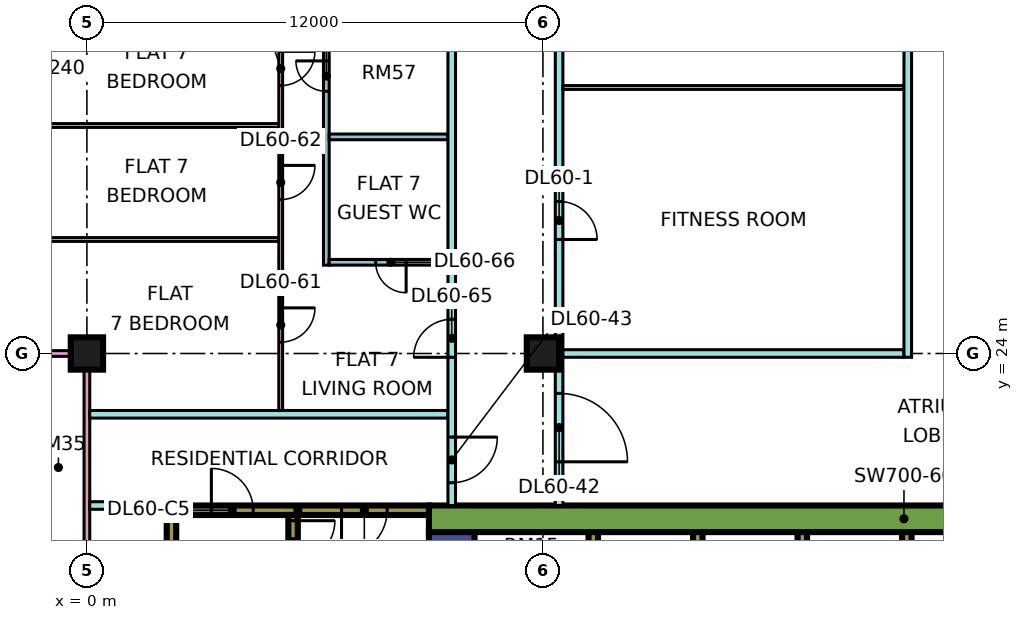
"""IFC4 building model, lengths in metres.
Left out: names, types, materials, properties, quantities, classifications, styles, units other than length and angle.
Written with IfcOpenShell. Run it as: python <this file> out.ifc"""

import sys

from ifc_helpers import new_model, si_unit, direction, frame, frame_2d, origin, origin_2d, place, context, subcontext, project, spatial, rectangle, extrude, element, fill, save


model = new_model("IFC4")
c1 = context("Model", 3, precision=1e-05, world=origin(), true_north=direction((0.0, 1.0)))
c2 = subcontext(c1, "Body", "Model", "MODEL_VIEW")
j1 = project(units=[si_unit("LENGTHUNIT", "METRE"), si_unit("PLANEANGLEUNIT", "RADIAN")], contexts=[c1])
p1 = place(None, origin())
s1 = spatial("IfcSite", under=j1, at=p1, CompositionType="ELEMENT")
p2 = place(p1, origin())
s2 = spatial("IfcBuilding", under=s1, at=p2, CompositionType="ELEMENT")
p3 = place(p2, frame((0.0, 0.0, 252.9)))
s3 = spatial("IfcBuildingStorey", under=s2, at=p3, CompositionType="ELEMENT", Elevation=252.9)
for number, where, z_axis, x_axis in (
    (1, (0.0, 24.0, 0.0), (0.0, 0.0, 1.0), (1.0, 0.0, 0.0)),
    (2, (12.0, 24.0, 0.0), (0.0, 0.0, 1.0), (1.0, 0.0, 0.0)),
):
    element("IfcColumn", number, at=place(p3, frame(where, z_axis=z_axis, x_axis=x_axis)), inside=s3, PredefinedType="COLUMN", context=c2, shape_type="SweptSolid", body=[
        extrude(rectangle(XDim=0.85, YDim=0.85, at=origin_2d()), origin(), (0.0, 0.0, 1.0), 3.75),
    ])
p4 = place(p3, frame((9.0, 19.65, 0.0), z_axis=(0.0, 0.0, 1.0), x_axis=(1.0, 0.0, 0.0)))
e3 = element("IfcWall", 3, at=p4, inside=s3, PredefinedType="SHEAR", context=c2, shape_type="SweptSolid", body=[
    extrude(rectangle(XDim=25.0, YDim=0.7, at=frame_2d((12.5, 0.0))), origin(), (0.0, 0.0, 1.0), 3.75),
])
p5 = place(p4, frame((19.1, 0.0, 0.0)))
e4 = element("IfcOpeningElement", 4, at=p5, cuts=e3, PredefinedType="OPENING", context=c2, shape_type="SweptSolid", body=[
    extrude(rectangle(XDim=1.8, YDim=2.4, at=frame_2d((0.9, 1.2))), frame((0.0, 0.36, 0.0), z_axis=(0.0, -1.0, 0.0), x_axis=(1.0, 0.0, 0.0)), (0.0, 0.0, 1.0), 0.72),
])
p6 = place(p3, frame((9.6, 7.7, 0.0), z_axis=(0.0, 0.0, 1.0), x_axis=(0.0, 1.0, 0.0)))
e5 = element("IfcWall", 5, at=p6, inside=s3, PredefinedType="SHEAR", context=c2, shape_type="SweptSolid", body=[
    extrude(rectangle(XDim=11.6, YDim=1.2, at=frame_2d((5.8, 0.0))), origin(), (0.0, 0.0, 1.0), 3.75),
])
p7 = place(p6, frame((4.175, 0.0, 0.0)))
e6 = element("IfcOpeningElement", 6, at=p7, cuts=e5, PredefinedType="OPENING", context=c2, shape_type="SweptSolid", body=[
    extrude(rectangle(XDim=1.1, YDim=2.2, at=frame_2d((0.55, 1.1))), frame((0.0, 0.61, 0.0), z_axis=(0.0, -1.0, 0.0), x_axis=(1.0, 0.0, 0.0)), (0.0, 0.0, 1.0), 1.22),
])
p8 = place(p6, frame((6.675, 0.0, 0.0)))
e7 = element("IfcOpeningElement", 7, at=p8, cuts=e5, PredefinedType="OPENING", context=c2, shape_type="SweptSolid", body=[
    extrude(rectangle(XDim=1.1, YDim=2.2, at=frame_2d((0.55, 1.1))), frame((0.0, 0.61, 0.0), z_axis=(0.0, -1.0, 0.0), x_axis=(1.0, 0.0, 0.0)), (0.0, 0.0, 1.0), 1.22),
])
p9 = place(p6, frame((9.55, 0.0, 0.0)))
e8 = element("IfcOpeningElement", 8, at=p9, cuts=e5, PredefinedType="OPENING", context=c2, shape_type="SweptSolid", body=[
    extrude(rectangle(XDim=1.1, YDim=2.2, at=frame_2d((0.55, 1.1))), frame((0.0, 0.61, 0.0), z_axis=(0.0, -1.0, 0.0), x_axis=(1.0, 0.0, 0.0)), (0.0, 0.0, 1.0), 1.22),
])
p10 = place(p6, frame((1.85, 0.0, 0.0)))
e9 = element("IfcOpeningElement", 9, at=p10, cuts=e5, PredefinedType="OPENING", context=c2, shape_type="SweptSolid", body=[
    extrude(rectangle(XDim=0.9, YDim=2.1, at=frame_2d((0.45, 1.05))), frame((0.0, 0.61, 0.0), z_axis=(0.0, -1.0, 0.0), x_axis=(1.0, 0.0, 0.0)), (0.0, 0.0, 1.0), 1.22),
])
p11 = place(p3, frame((13.325, 7.7, 0.0), z_axis=(0.0, 0.0, 1.0), x_axis=(0.0, 1.0, 0.0)))
e10 = element("IfcWall", 10, at=p11, inside=s3, PredefinedType="SHEAR", context=c2, shape_type="SweptSolid", body=[
    extrude(rectangle(XDim=11.6, YDim=0.25, at=frame_2d((5.8, 0.0))), origin(), (0.0, 0.0, 1.0), 3.75),
])
for number, where, z_axis, x_axis in (
    (11, (16.075, 15.8, 0.0), (0.0, 0.0, 1.0), (0.0, 1.0, 0.0)),
    (12, (18.825, 15.8, 0.0), (0.0, 0.0, 1.0), (0.0, 1.0, 0.0)),
    (13, (21.575, 15.8, 0.0), (0.0, 0.0, 1.0), (0.0, 1.0, 0.0)),
):
    element("IfcWall", number, at=place(p3, frame(where, z_axis=z_axis, x_axis=x_axis)), inside=s3, PredefinedType="SHEAR", context=c2, shape_type="SweptSolid", body=[
        extrude(rectangle(XDim=3.5, YDim=0.25, at=frame_2d((1.75, 0.0))), origin(), (0.0, 0.0, 1.0), 3.75),
    ])
p12 = place(p3, frame((2.1, 19.875, 0.0), z_axis=(0.0, 0.0, 1.0), x_axis=(1.0, 0.0, 0.0)))
e14 = element("IfcWall", 14, at=p12, inside=s3, PredefinedType="SHEAR", context=c2, shape_type="SweptSolid", body=[
    extrude(rectangle(XDim=6.9, YDim=0.25, at=frame_2d((3.45, 0.0))), origin(), (0.0, 0.0, 1.0), 3.75),
])
p13 = place(p12, frame((1.175, 0.0, 0.0)))
e15 = element("IfcOpeningElement", 15, at=p13, cuts=e14, PredefinedType="OPENING", context=c2, shape_type="SweptSolid", body=[
    extrude(rectangle(XDim=1.1, YDim=2.2, at=frame_2d((0.55, 1.1))), frame((0.0, 0.135, 0.0), z_axis=(0.0, -1.0, 0.0), x_axis=(1.0, 0.0, 0.0)), (0.0, 0.0, 1.0), 0.27),
])
p14 = place(p12, frame((4.6, 0.0, 0.0)))
e16 = element("IfcOpeningElement", 16, at=p14, cuts=e14, PredefinedType="OPENING", context=c2, shape_type="SweptSolid", body=[
    extrude(rectangle(XDim=1.2, YDim=2.2, at=frame_2d((0.6, 1.1))), frame((0.0, 0.135, 0.0), z_axis=(0.0, -1.0, 0.0), x_axis=(1.0, 0.0, 0.0)), (0.0, 0.0, 1.0), 0.27),
])
p15 = place(p3, frame((2.225, 13.25, 0.0), z_axis=(0.0, 0.0, 1.0), x_axis=(0.0, 1.0, 0.0)))
e17 = element("IfcWall", 17, at=p15, inside=s3, PredefinedType="SHEAR", context=c2, shape_type="SweptSolid", body=[
    extrude(rectangle(XDim=6.5, YDim=0.25, at=frame_2d((3.25, 0.0))), origin(), (0.0, 0.0, 1.0), 3.75),
])
p16 = place(p3, frame((5.425, 13.25, 0.0), z_axis=(0.0, 0.0, 1.0), x_axis=(0.0, 1.0, 0.0)))
e18 = element("IfcWall", 18, at=p16, inside=s3, PredefinedType="SHEAR", context=c2, shape_type="SweptSolid", body=[
    extrude(rectangle(XDim=6.5, YDim=0.25, at=frame_2d((3.25, 0.0))), origin(), (0.0, 0.0, 1.0), 3.75),
])
p17 = place(p16, frame((5.25, 0.0, 0.0)))
e19 = element("IfcOpeningElement", 19, at=p17, cuts=e18, PredefinedType="OPENING", context=c2, shape_type="SweptSolid", body=[
    extrude(rectangle(XDim=1.1, YDim=2.2, at=frame_2d((0.55, 1.1))), frame((0.0, 0.135, 0.0), z_axis=(0.0, -1.0, 0.0), x_axis=(1.0, 0.0, 0.0)), (0.0, 0.0, 1.0), 0.27),
])
p18 = place(p3, frame((0.0, 23.925, 0.0), z_axis=(0.0, 0.0, 1.0), x_axis=(0.0, -1.0, 0.0)))
e20 = element("IfcWall", 20, at=p18, inside=s3, PredefinedType="SOLIDWALL", context=c2, shape_type="SweptSolid", body=[
    extrude(rectangle(XDim=11.35, YDim=0.15, at=frame_2d((5.675, 0.0))), origin(), (0.0, 0.0, 1.0), 3.3),
])
p19 = place(p18, frame((6.738, 0.0, 0.0)))
e21 = element("IfcOpeningElement", 21, at=p19, cuts=e20, PredefinedType="OPENING", context=c2, shape_type="SweptSolid", body=[
    extrude(rectangle(XDim=1.8, YDim=2.4, at=frame_2d((0.9, 1.2))), frame((0.0, 0.085, 0.0), z_axis=(0.0, -1.0, 0.0), x_axis=(1.0, 0.0, 0.0)), (0.0, 0.0, 1.0), 0.17),
])
p20 = place(p3, frame((-1.5, 24.0, 0.0), z_axis=(0.0, 0.0, 1.0), x_axis=(1.0, 0.0, 0.0)))
e22 = element("IfcWall", 22, at=p20, inside=s3, PredefinedType="SOLIDWALL", context=c2, shape_type="SweptSolid", body=[
    extrude(rectangle(XDim=1.5, YDim=0.15, at=frame_2d((0.75, 0.0))), origin(), (0.0, 0.0, 1.0), 3.3),
])
for number, where, z_axis, x_axis in (
    (23, (-1.351, 27.0, 0.0), (0.0, 0.0, 1.0), (1.0, 0.0, 0.0)),
    (24, (-1.351, 30.0, 0.0), (0.0, 0.0, 1.0), (1.0, 0.0, 0.0)),
):
    element("IfcWall", number, at=place(p3, frame(where, z_axis=z_axis, x_axis=x_axis)), inside=s3, PredefinedType="PARTITIONING", context=c2, shape_type="SweptSolid", body=[
        extrude(rectangle(XDim=6.401, YDim=0.1, at=frame_2d((3.201, 0.0))), origin(), (0.0, 0.0, 1.0), 3.3),
    ])
p21 = place(p3, frame((0.074, 20.0, 0.0), z_axis=(0.0, 0.0, 1.0), x_axis=(1.0, 0.0, 0.0)))
e25 = element("IfcWall", 25, at=p21, inside=s3, PredefinedType="PARTITIONING", context=c2, shape_type="SweptSolid", body=[
    extrude(rectangle(XDim=2.026, YDim=0.2, at=frame_2d((1.013, 0.0))), origin(), (0.0, 0.0, 1.0), 3.3),
])
p22 = place(p3, frame((0.074, 22.4, 0.0), z_axis=(0.0, 0.0, 1.0), x_axis=(1.0, 0.0, 0.0)))
e26 = element("IfcWall", 26, at=p22, inside=s3, PredefinedType="PARTITIONING", context=c2, shape_type="SweptSolid", body=[
    extrude(rectangle(XDim=9.426, YDim=0.2, at=frame_2d((4.713, 0.0))), origin(), (0.0, 0.0, 1.0), 3.3),
])
p23 = place(p3, frame((5.1, 22.5, 0.0), z_axis=(0.0, 0.0, 1.0), x_axis=(0.0, 1.0, 0.0)))
e27 = element("IfcWall", 27, at=p23, inside=s3, PredefinedType="PARTITIONING", context=c2, shape_type="SweptSolid", body=[
    extrude(rectangle(XDim=10.55, YDim=0.1, at=frame_2d((5.275, 0.0))), origin(), (0.0, 0.0, 1.0), 3.3),
])
p24 = place(p23, frame((1.8, 0.0, 0.0)))
e28 = element("IfcOpeningElement", 28, at=p24, cuts=e27, PredefinedType="OPENING", context=c2, shape_type="SweptSolid", body=[
    extrude(rectangle(XDim=0.9, YDim=2.1, at=frame_2d((0.45, 1.05))), frame((0.0, 0.06, 0.0), z_axis=(0.0, -1.0, 0.0), x_axis=(1.0, 0.0, 0.0)), (0.0, 0.0, 1.0), 0.12),
])
p25 = place(p23, frame((5.55, 0.0, 0.0)))
e29 = element("IfcOpeningElement", 29, at=p25, cuts=e27, PredefinedType="OPENING", context=c2, shape_type="SweptSolid", body=[
    extrude(rectangle(XDim=0.9, YDim=2.1, at=frame_2d((0.45, 1.05))), frame((0.0, 0.06, 0.0), z_axis=(0.0, -1.0, 0.0), x_axis=(1.0, 0.0, 0.0)), (0.0, 0.0, 1.0), 0.12),
])
p26 = place(p23, frame((8.55, 0.0, 0.0)))
e30 = element("IfcOpeningElement", 30, at=p26, cuts=e27, PredefinedType="OPENING", context=c2, shape_type="SweptSolid", body=[
    extrude(rectangle(XDim=0.9, YDim=2.1, at=frame_2d((0.45, 1.05))), frame((0.0, 0.06, 0.0), z_axis=(0.0, -1.0, 0.0), x_axis=(1.0, 0.0, 0.0)), (0.0, 0.0, 1.0), 0.12),
])
p27 = place(p3, frame((6.3, 26.325, 0.0), z_axis=(0.0, 0.0, 1.0), x_axis=(0.0, 1.0, 0.0)))
e31 = element("IfcWall", 31, at=p27, inside=s3, PredefinedType="PARTITIONING", context=c2, shape_type="SweptSolid", body=[
    extrude(rectangle(XDim=9.575, YDim=0.15, at=frame_2d((4.788, 0.0))), origin(), (0.0, 0.0, 1.0), 3.3),
])
p28 = place(p27, frame((4.575, 0.0, 0.0)))
e32 = element("IfcOpeningElement", 32, at=p28, cuts=e31, PredefinedType="OPENING", context=c2, shape_type="SweptSolid", body=[
    extrude(rectangle(XDim=0.8, YDim=2.1, at=frame_2d((0.4, 1.05))), frame((0.0, 0.085, 0.0), z_axis=(0.0, -1.0, 0.0), x_axis=(1.0, 0.0, 0.0)), (0.0, 0.0, 1.0), 0.17),
])
p29 = place(p27, frame((7.725, 0.0, 0.0)))
e33 = element("IfcOpeningElement", 33, at=p29, cuts=e31, PredefinedType="OPENING", context=c2, shape_type="SweptSolid", body=[
    extrude(rectangle(XDim=0.9, YDim=2.1, at=frame_2d((0.45, 1.05))), frame((0.0, 0.085, 0.0), z_axis=(0.0, -1.0, 0.0), x_axis=(1.0, 0.0, 0.0)), (0.0, 0.0, 1.0), 0.17),
])
p30 = place(p3, frame((6.375, 26.4, 0.0), z_axis=(0.0, 0.0, 1.0), x_axis=(1.0, 0.0, 0.0)))
e34 = element("IfcWall", 34, at=p30, inside=s3, PredefinedType="PARTITIONING", context=c2, shape_type="SweptSolid", body=[
    extrude(rectangle(XDim=3.125, YDim=0.15, at=frame_2d((1.562, 0.0))), origin(), (0.0, 0.0, 1.0), 3.3),
])
p31 = place(p30, frame((1.225, 0.0, 0.0)))
e35 = element("IfcOpeningElement", 35, at=p31, cuts=e34, PredefinedType="OPENING", context=c2, shape_type="SweptSolid", body=[
    extrude(rectangle(XDim=0.8, YDim=2.1, at=frame_2d((0.4, 1.05))), frame((0.0, 0.085, 0.0), z_axis=(0.0, -1.0, 0.0), x_axis=(1.0, 0.0, 0.0)), (0.0, 0.0, 1.0), 0.17),
])
p32 = place(p3, frame((6.375, 29.7, 0.0), z_axis=(0.0, 0.0, 1.0), x_axis=(1.0, 0.0, 0.0)))
e36 = element("IfcWall", 36, at=p32, inside=s3, PredefinedType="PARTITIONING", context=c2, shape_type="SweptSolid", body=[
    extrude(rectangle(XDim=3.125, YDim=0.15, at=frame_2d((1.562, 0.0))), origin(), (0.0, 0.0, 1.0), 3.3),
])
p33 = place(p3, frame((9.6, 20.0, 0.0), z_axis=(0.0, 0.0, 1.0), x_axis=(0.0, 1.0, 0.0)))
e37 = element("IfcWall", 37, at=p33, inside=s3, PredefinedType="PARTITIONING", context=c2, shape_type="SweptSolid", body=[
    extrude(rectangle(XDim=44.35, YDim=0.2, at=frame_2d((22.175, 0.0))), origin(), (0.0, 0.0, 1.0), 3.3),
])
p34 = place(p33, frame((28.8, 0.0, 0.0)))
e38 = element("IfcOpeningElement", 38, at=p34, cuts=e37, PredefinedType="OPENING", context=c2, shape_type="SweptSolid", body=[
    extrude(rectangle(XDim=1.0, YDim=2.1, at=frame_2d((0.5, 1.05))), frame((0.0, 0.11, 0.0), z_axis=(0.0, -1.0, 0.0), x_axis=(1.0, 0.0, 0.0)), (0.0, 0.0, 1.0), 0.22),
])
p35 = place(p33, frame((0.6, 0.0, 0.0)))
e39 = element("IfcOpeningElement", 39, at=p35, cuts=e37, PredefinedType="OPENING", context=c2, shape_type="SweptSolid", body=[
    extrude(rectangle(XDim=1.2, YDim=2.1, at=frame_2d((0.6, 1.05))), frame((0.0, 0.11, 0.0), z_axis=(0.0, -1.0, 0.0), x_axis=(1.0, 0.0, 0.0)), (0.0, 0.0, 1.0), 0.22),
])
p36 = place(p33, frame((3.9, 0.0, 0.0)))
e40 = element("IfcOpeningElement", 40, at=p36, cuts=e37, PredefinedType="OPENING", context=c2, shape_type="SweptSolid", body=[
    extrude(rectangle(XDim=1.0, YDim=2.1, at=frame_2d((0.5, 1.05))), frame((0.0, 0.11, 0.0), z_axis=(0.0, -1.0, 0.0), x_axis=(1.0, 0.0, 0.0)), (0.0, 0.0, 1.0), 0.22),
])
p37 = place(p3, frame((12.425, 20.0, 0.0), z_axis=(0.0, 0.0, 1.0), x_axis=(0.0, 1.0, 0.0)))
e41 = element("IfcWall", 41, at=p37, inside=s3, PredefinedType="PARTITIONING", context=c2, shape_type="SweptSolid", body=[
    extrude(rectangle(XDim=42.926, YDim=0.2, at=frame_2d((21.463, 0.0))), origin(), (0.0, 0.0, 1.0), 3.3),
])
p38 = place(p37, frame((7.0, 0.0, 0.0)))
e42 = element("IfcOpeningElement", 42, at=p38, cuts=e41, PredefinedType="OPENING", context=c2, shape_type="SweptSolid", body=[
    extrude(rectangle(XDim=1.0, YDim=2.1, at=frame_2d((0.5, 1.05))), frame((0.0, 0.11, 0.0), z_axis=(0.0, -1.0, 0.0), x_axis=(1.0, 0.0, 0.0)), (0.0, 0.0, 1.0), 0.22),
])
p39 = place(p37, frame((12.95, 0.0, 0.0)))
e43 = element("IfcOpeningElement", 43, at=p39, cuts=e41, PredefinedType="OPENING", context=c2, shape_type="SweptSolid", body=[
    extrude(rectangle(XDim=1.0, YDim=2.1, at=frame_2d((0.5, 1.05))), frame((0.0, 0.11, 0.0), z_axis=(0.0, -1.0, 0.0), x_axis=(1.0, 0.0, 0.0)), (0.0, 0.0, 1.0), 0.22),
])
p40 = place(p37, frame((16.75, 0.0, 0.0)))
e44 = element("IfcOpeningElement", 44, at=p40, cuts=e41, PredefinedType="OPENING", context=c2, shape_type="SweptSolid", body=[
    extrude(rectangle(XDim=1.0, YDim=2.1, at=frame_2d((0.5, 1.05))), frame((0.0, 0.11, 0.0), z_axis=(0.0, -1.0, 0.0), x_axis=(1.0, 0.0, 0.0)), (0.0, 0.0, 1.0), 0.22),
])
p41 = place(p37, frame((34.9, 0.0, 0.0)))
e45 = element("IfcOpeningElement", 45, at=p41, cuts=e41, PredefinedType="OPENING", context=c2, shape_type="SweptSolid", body=[
    extrude(rectangle(XDim=1.0, YDim=2.1, at=frame_2d((0.5, 1.05))), frame((0.0, 0.11, 0.0), z_axis=(0.0, -1.0, 0.0), x_axis=(1.0, 0.0, 0.0)), (0.0, 0.0, 1.0), 0.22),
])
p42 = place(p37, frame((1.15, 0.0, 0.0)))
e46 = element("IfcOpeningElement", 46, at=p42, cuts=e41, PredefinedType="OPENING", context=c2, shape_type="SweptSolid", body=[
    extrude(rectangle(XDim=1.8, YDim=2.1, at=frame_2d((0.9, 1.05))), frame((0.0, 0.11, 0.0), z_axis=(0.0, -1.0, 0.0), x_axis=(1.0, 0.0, 0.0)), (0.0, 0.0, 1.0), 0.22),
])
p43 = place(p37, frame((28.6, 0.0, 0.0)))
e47 = element("IfcOpeningElement", 47, at=p43, cuts=e41, PredefinedType="OPENING", context=c2, shape_type="SweptSolid", body=[
    extrude(rectangle(XDim=1.8, YDim=2.1, at=frame_2d((0.9, 1.05))), frame((0.0, 0.11, 0.0), z_axis=(0.0, -1.0, 0.0), x_axis=(1.0, 0.0, 0.0)), (0.0, 0.0, 1.0), 0.22),
])
p44 = place(p3, frame((12.525, 24.0, 0.0), z_axis=(0.0, 0.0, 1.0), x_axis=(1.0, 0.0, 0.0)))
e48 = element("IfcWall", 48, at=p44, inside=s3, PredefinedType="PARTITIONING", context=c2, shape_type="SweptSolid", body=[
    extrude(rectangle(XDim=8.975, YDim=0.2, at=frame_2d((4.488, 0.0))), origin(), (0.0, 0.0, 1.0), 3.3),
])
p45 = place(p3, frame((12.525, 31.0, 0.0), z_axis=(0.0, 0.0, 1.0), x_axis=(1.0, 0.0, 0.0)))
e49 = element("IfcWall", 49, at=p45, inside=s3, PredefinedType="PARTITIONING", context=c2, shape_type="SweptSolid", body=[
    extrude(rectangle(XDim=8.975, YDim=0.1, at=frame_2d((4.488, 0.0))), origin(), (0.0, 0.0, 1.0), 3.3),
])
p46 = place(p3, frame((21.6, 23.9, 0.0), z_axis=(0.0, 0.0, 1.0), x_axis=(0.0, 1.0, 0.0)))
e50 = element("IfcWall", 50, at=p46, inside=s3, PredefinedType="PARTITIONING", context=c2, shape_type="SweptSolid", body=[
    extrude(rectangle(XDim=12.0, YDim=0.2, at=frame_2d((6.0, 0.0))), origin(), (0.0, 0.0, 1.0), 3.3),
])
p47 = place(p17, origin())
e51 = element("IfcDoor", 51, at=p47, inside=s3, OperationType="SINGLE_SWING_RIGHT", PredefinedType="DOOR", context=c2, shape_type="SweptSolid", body=[
    extrude(rectangle(XDim=1.1, YDim=2.2, at=frame_2d((0.55, 1.1))), frame((0.0, 0.025, 0.0), z_axis=(0.0, -1.0, 0.0), x_axis=(1.0, 0.0, 0.0)), (0.0, 0.0, 1.0), 0.05),
])
fill(e19, e51)
p48 = place(p13, origin())
e52 = element("IfcDoor", 52, at=p48, inside=s3, OperationType="SINGLE_SWING_LEFT", PredefinedType="DOOR", context=c2, shape_type="SweptSolid", body=[
    extrude(rectangle(XDim=1.1, YDim=2.2, at=frame_2d((0.55, 1.1))), frame((0.0, 0.025, 0.0), z_axis=(0.0, -1.0, 0.0), x_axis=(1.0, 0.0, 0.0)), (0.0, 0.0, 1.0), 0.05),
])
fill(e15, e52)
p49 = place(p14, frame((1.2, 0.0, 0.0), z_axis=(0.0, 0.0, 1.0), x_axis=(-1.0, 0.0, 0.0)))
e53 = element("IfcDoor", 53, at=p49, inside=s3, OperationType="SINGLE_SWING_LEFT", PredefinedType="DOOR", context=c2, shape_type="SweptSolid", body=[
    extrude(rectangle(XDim=1.2, YDim=2.2, at=frame_2d((0.6, 1.1))), frame((0.0, 0.025, 0.0), z_axis=(0.0, -1.0, 0.0), x_axis=(1.0, 0.0, 0.0)), (0.0, 0.0, 1.0), 0.05),
])
fill(e16, e53)
p50 = place(p38, frame((1.0, 0.0, 0.0), z_axis=(0.0, 0.0, 1.0), x_axis=(-1.0, 0.0, 0.0)))
e54 = element("IfcDoor", 54, at=p50, inside=s3, OperationType="SINGLE_SWING_LEFT", PredefinedType="DOOR", context=c2, shape_type="SweptSolid", body=[
    extrude(rectangle(XDim=1.0, YDim=2.1, at=frame_2d((0.5, 1.05))), frame((0.0, 0.025, 0.0), z_axis=(0.0, -1.0, 0.0), x_axis=(1.0, 0.0, 0.0)), (0.0, 0.0, 1.0), 0.05),
])
fill(e42, e54)
p51 = place(p42, frame((1.8, 0.0, 0.0), z_axis=(0.0, 0.0, 1.0), x_axis=(-1.0, 0.0, 0.0)))
e55 = element("IfcDoor", 55, at=p51, inside=s3, OperationType="DOUBLE_DOOR_SINGLE_SWING", PredefinedType="DOOR", context=c2, shape_type="SweptSolid", body=[
    extrude(rectangle(XDim=1.8, YDim=2.1, at=frame_2d((0.9, 1.05))), frame((0.0, 0.025, 0.0), z_axis=(0.0, -1.0, 0.0), x_axis=(1.0, 0.0, 0.0)), (0.0, 0.0, 1.0), 0.05),
])
fill(e46, e55)
p52 = place(p35, origin())
e56 = element("IfcDoor", 56, at=p52, inside=s3, OperationType="SINGLE_SWING_RIGHT", PredefinedType="DOOR", context=c2, shape_type="SweptSolid", body=[
    extrude(rectangle(XDim=1.2, YDim=2.1, at=frame_2d((0.6, 1.05))), frame((0.0, 0.025, 0.0), z_axis=(0.0, -1.0, 0.0), x_axis=(1.0, 0.0, 0.0)), (0.0, 0.0, 1.0), 0.05),
])
fill(e39, e56)
p53 = place(p28, frame((0.8, 0.0, 0.0), z_axis=(0.0, 0.0, 1.0), x_axis=(-1.0, 0.0, 0.0)))
e57 = element("IfcDoor", 57, at=p53, inside=s3, OperationType="SINGLE_SWING_RIGHT", PredefinedType="DOOR", context=c2, shape_type="SweptSolid", body=[
    extrude(rectangle(XDim=0.8, YDim=2.1, at=frame_2d((0.4, 1.05))), frame((0.0, 0.025, 0.0), z_axis=(0.0, -1.0, 0.0), x_axis=(1.0, 0.0, 0.0)), (0.0, 0.0, 1.0), 0.05),
])
fill(e32, e57)
p54 = place(p24, origin())
e58 = element("IfcDoor", 58, at=p54, inside=s3, OperationType="SINGLE_SWING_RIGHT", PredefinedType="DOOR", context=c2, shape_type="SweptSolid", body=[
    extrude(rectangle(XDim=0.9, YDim=2.1, at=frame_2d((0.45, 1.05))), frame((0.0, 0.025, 0.0), z_axis=(0.0, -1.0, 0.0), x_axis=(1.0, 0.0, 0.0)), (0.0, 0.0, 1.0), 0.05),
])
fill(e28, e58)
p55 = place(p25, origin())
e59 = element("IfcDoor", 59, at=p55, inside=s3, OperationType="SINGLE_SWING_RIGHT", PredefinedType="DOOR", context=c2, shape_type="SweptSolid", body=[
    extrude(rectangle(XDim=0.9, YDim=2.1, at=frame_2d((0.45, 1.05))), frame((0.0, 0.025, 0.0), z_axis=(0.0, -1.0, 0.0), x_axis=(1.0, 0.0, 0.0)), (0.0, 0.0, 1.0), 0.05),
])
fill(e29, e59)
p56 = place(p26, origin())
e60 = element("IfcDoor", 60, at=p56, inside=s3, OperationType="SINGLE_SWING_RIGHT", PredefinedType="DOOR", context=c2, shape_type="SweptSolid", body=[
    extrude(rectangle(XDim=0.9, YDim=2.1, at=frame_2d((0.45, 1.05))), frame((0.0, 0.025, 0.0), z_axis=(0.0, -1.0, 0.0), x_axis=(1.0, 0.0, 0.0)), (0.0, 0.0, 1.0), 0.05),
])
fill(e30, e60)
p57 = place(p36, origin())
e61 = element("IfcDoor", 61, at=p57, inside=s3, OperationType="SINGLE_SWING_LEFT", PredefinedType="DOOR", context=c2, shape_type="SweptSolid", body=[
    extrude(rectangle(XDim=1.0, YDim=2.1, at=frame_2d((0.5, 1.05))), frame((0.0, 0.025, 0.0), z_axis=(0.0, -1.0, 0.0), x_axis=(1.0, 0.0, 0.0)), (0.0, 0.0, 1.0), 0.05),
])
fill(e40, e61)
p58 = place(p31, origin())
e62 = element("IfcDoor", 62, at=p58, inside=s3, OperationType="SINGLE_SWING_RIGHT", PredefinedType="DOOR", context=c2, shape_type="SweptSolid", body=[
    extrude(rectangle(XDim=0.8, YDim=2.1, at=frame_2d((0.4, 1.05))), frame((0.0, 0.025, 0.0), z_axis=(0.0, -1.0, 0.0), x_axis=(1.0, 0.0, 0.0)), (0.0, 0.0, 1.0), 0.05),
])
fill(e35, e62)
save(model, sys.argv[1])
